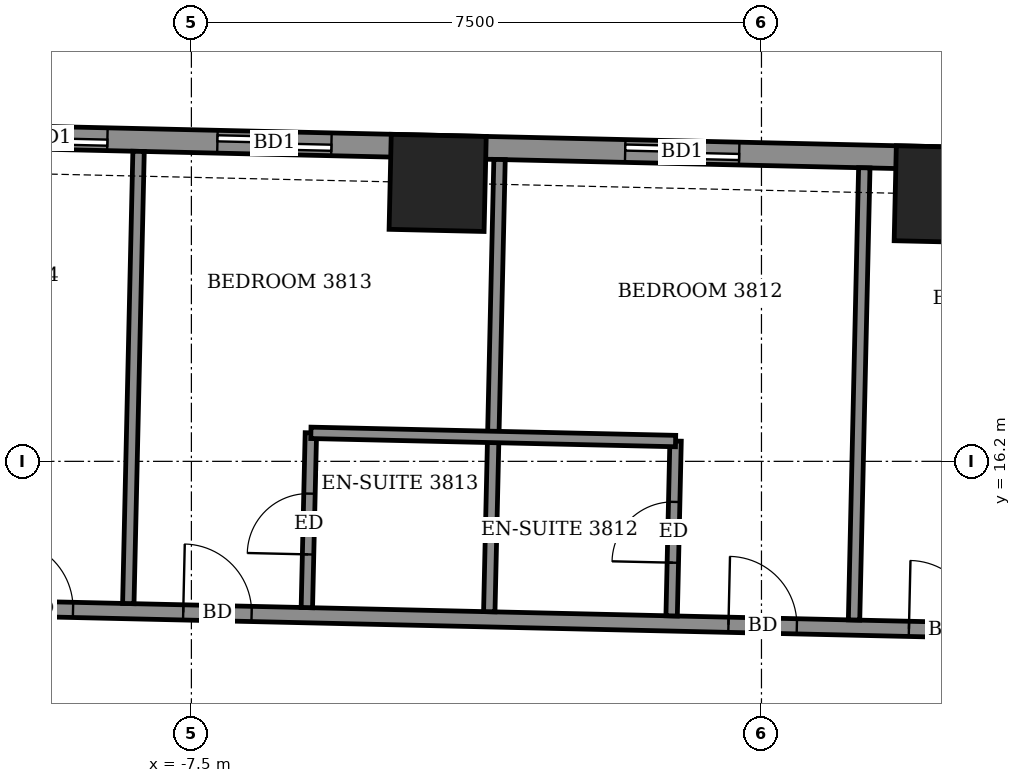
"""IFC4 building model, lengths in metres.
Left out: names, types, materials, properties, quantities, classifications, styles, units other than length and angle.
Written with IfcOpenShell. Run it as: python <this file> out.ifc"""

import sys

from ifc_helpers import new_model, si_unit, direction, frame, frame_2d, origin, origin_2d, place, context, subcontext, project, spatial, rectangle, extrude, element, fill, save


model = new_model("IFC4")
c1 = context("Model", 3, precision=1e-05, world=origin(), true_north=direction((0.0, 1.0)))
c2 = subcontext(c1, "Body", "Model", "MODEL_VIEW")
j1 = project(units=[si_unit("LENGTHUNIT", "METRE"), si_unit("PLANEANGLEUNIT", "RADIAN")], contexts=[c1])
p1 = place(None, origin())
s1 = spatial("IfcSite", under=j1, at=p1, CompositionType="ELEMENT")
p2 = place(p1, origin())
s2 = spatial("IfcBuilding", under=s1, at=p2, CompositionType="ELEMENT")
p3 = place(p2, frame((0.0, 0.0, 152.7)))
s3 = spatial("IfcBuildingStorey", under=s2, at=p3, CompositionType="ELEMENT", Elevation=152.7)
for number, where, z_axis, x_axis in (
    (1, (2.385, 19.713, -0.55), (0.0, 0.0, 1.0), (-1.0, 0.023, 0.0)),
    (2, (-4.26, 19.863, -0.55), (0.0, 0.0, 1.0), (-1.0, 0.023, 0.0)),
):
    element("IfcColumn", number, at=place(p3, frame(where, z_axis=z_axis, x_axis=x_axis)), inside=s3, PredefinedType="COLUMN", context=c2, shape_type="SweptSolid", body=[
        extrude(rectangle(XDim=1.25, YDim=1.25, at=origin_2d()), origin(), (0.0, 0.0, 1.0), 3.6),
    ])
p4 = place(p3, frame((22.181, 19.739, 0.0), z_axis=(0.0, 0.0, 1.0), x_axis=(-0.999742618326, 0.022686936846, 0.0)))
e3 = element("IfcWall", 3, at=p4, inside=s3, PredefinedType="SOLIDWALL", context=c2, shape_type="SweptSolid", body=[
    extrude(rectangle(XDim=39.58, YDim=0.3, at=frame_2d((19.79, 0.0))), origin(), (0.0, 0.0, 1.0), 3.05),
])
p5 = place(p4, frame((2.716, 0.0, 0.0)))
e4 = element("IfcOpeningElement", 4, at=p5, cuts=e3, PredefinedType="OPENING", context=c2, shape_type="SweptSolid", body=[
    extrude(rectangle(XDim=1.5, YDim=2.4, at=frame_2d((0.75, 1.2))), frame((0.0, 0.16, 0.0), z_axis=(0.0, -1.0, 0.0), x_axis=(1.0, 0.0, 0.0)), (0.0, 0.0, 1.0), 0.32),
])
p6 = place(p4, frame((8.326, 0.0, 0.0)))
e5 = element("IfcOpeningElement", 5, at=p6, cuts=e3, PredefinedType="OPENING", context=c2, shape_type="SweptSolid", body=[
    extrude(rectangle(XDim=1.5, YDim=2.4, at=frame_2d((0.75, 1.2))), frame((0.0, 0.16, 0.0), z_axis=(0.0, -1.0, 0.0), x_axis=(1.0, 0.0, 0.0)), (0.0, 0.0, 1.0), 0.32),
])
p7 = place(p4, frame((14.049, 0.0, 0.0)))
e6 = element("IfcOpeningElement", 6, at=p7, cuts=e3, PredefinedType="OPENING", context=c2, shape_type="SweptSolid", body=[
    extrude(rectangle(XDim=1.5, YDim=2.4, at=frame_2d((0.75, 1.2))), frame((0.0, 0.16, 0.0), z_axis=(0.0, -1.0, 0.0), x_axis=(1.0, 0.0, 0.0)), (0.0, 0.0, 1.0), 0.32),
])
p8 = place(p4, frame((16.998, 0.0, 0.0)))
e7 = element("IfcOpeningElement", 7, at=p8, cuts=e3, PredefinedType="OPENING", context=c2, shape_type="SweptSolid", body=[
    extrude(rectangle(XDim=1.5, YDim=2.4, at=frame_2d((0.75, 1.2))), frame((0.0, 0.16, 0.0), z_axis=(0.0, -1.0, 0.0), x_axis=(1.0, 0.0, 0.0)), (0.0, 0.0, 1.0), 0.32),
])
p9 = place(p4, frame((22.48, 0.0, 0.0)))
e8 = element("IfcOpeningElement", 8, at=p9, cuts=e3, PredefinedType="OPENING", context=c2, shape_type="SweptSolid", body=[
    extrude(rectangle(XDim=1.5, YDim=2.4, at=frame_2d((0.75, 1.2))), frame((0.0, 0.16, 0.0), z_axis=(0.0, -1.0, 0.0), x_axis=(1.0, 0.0, 0.0)), (0.0, 0.0, 1.0), 0.32),
])
p10 = place(p4, frame((27.846, 0.0, 0.0)))
e9 = element("IfcOpeningElement", 9, at=p10, cuts=e3, PredefinedType="OPENING", context=c2, shape_type="SweptSolid", body=[
    extrude(rectangle(XDim=1.5, YDim=2.4, at=frame_2d((0.75, 1.2))), frame((0.0, 0.16, 0.0), z_axis=(0.0, -1.0, 0.0), x_axis=(1.0, 0.0, 0.0)), (0.0, 0.0, 1.0), 0.32),
])
p11 = place(p4, frame((30.794, 0.0, 0.0)))
e10 = element("IfcOpeningElement", 10, at=p11, cuts=e3, PredefinedType="OPENING", context=c2, shape_type="SweptSolid", body=[
    extrude(rectangle(XDim=1.5, YDim=2.4, at=frame_2d((0.75, 1.2))), frame((0.0, 0.16, 0.0), z_axis=(0.0, -1.0, 0.0), x_axis=(1.0, 0.0, 0.0)), (0.0, 0.0, 1.0), 0.32),
])
p12 = place(p4, frame((35.705, 0.0, 0.9)))
e11 = element("IfcOpeningElement", 11, at=p12, cuts=e3, PredefinedType="OPENING", context=c2, shape_type="SweptSolid", body=[
    extrude(rectangle(XDim=2.4, YDim=1.5, at=frame_2d((1.2, 0.75))), frame((0.0, 0.16, 0.0), z_axis=(0.0, -1.0, 0.0), x_axis=(1.0, 0.0, 0.0)), (0.0, 0.0, 1.0), 0.32),
])
p13 = place(p3, frame((-21.279, 14.523, 0.0), z_axis=(0.0, 0.0, 1.0), x_axis=(0.999742669174, -0.02268469602, 0.0)))
e12 = element("IfcWall", 12, at=p13, inside=s3, PredefinedType="PARTITIONING", context=c2, shape_type="SweptSolid", body=[
    extrude(rectangle(XDim=40.639, YDim=0.2, at=frame_2d((20.319, 0.0))), origin(), (0.0, 0.0, 1.0), 3.05),
])
p14 = place(p13, frame((37.65, 0.0, 0.0)))
e13 = element("IfcOpeningElement", 13, at=p14, cuts=e12, PredefinedType="OPENING", context=c2, shape_type="SweptSolid", body=[
    extrude(rectangle(XDim=0.9, YDim=2.1, at=frame_2d((0.45, 1.05))), frame((0.0, 0.11, 0.0), z_axis=(0.0, -1.0, 0.0), x_axis=(1.0, 0.0, 0.0)), (0.0, 0.0, 1.0), 0.22),
])
p15 = place(p13, frame((32.775, 0.0, 0.0)))
e14 = element("IfcOpeningElement", 14, at=p15, cuts=e12, PredefinedType="OPENING", context=c2, shape_type="SweptSolid", body=[
    extrude(rectangle(XDim=0.9, YDim=2.1, at=frame_2d((0.45, 1.05))), frame((0.0, 0.11, 0.0), z_axis=(0.0, -1.0, 0.0), x_axis=(1.0, 0.0, 0.0)), (0.0, 0.0, 1.0), 0.22),
])
p16 = place(p13, frame((30.4, 0.0, 0.0)))
e15 = element("IfcOpeningElement", 15, at=p16, cuts=e12, PredefinedType="OPENING", context=c2, shape_type="SweptSolid", body=[
    extrude(rectangle(XDim=0.9, YDim=2.1, at=frame_2d((0.45, 1.05))), frame((0.0, 0.11, 0.0), z_axis=(0.0, -1.0, 0.0), x_axis=(1.0, 0.0, 0.0)), (0.0, 0.0, 1.0), 0.22),
])
p17 = place(p13, frame((23.225, 0.0, 0.0)))
e16 = element("IfcOpeningElement", 16, at=p17, cuts=e12, PredefinedType="OPENING", context=c2, shape_type="SweptSolid", body=[
    extrude(rectangle(XDim=0.9, YDim=2.1, at=frame_2d((0.45, 1.05))), frame((0.0, 0.11, 0.0), z_axis=(0.0, -1.0, 0.0), x_axis=(1.0, 0.0, 0.0)), (0.0, 0.0, 1.0), 0.22),
])
p18 = place(p13, frame((20.85, 0.0, 0.0)))
e17 = element("IfcOpeningElement", 17, at=p18, cuts=e12, PredefinedType="OPENING", context=c2, shape_type="SweptSolid", body=[
    extrude(rectangle(XDim=0.9, YDim=2.1, at=frame_2d((0.45, 1.05))), frame((0.0, 0.11, 0.0), z_axis=(0.0, -1.0, 0.0), x_axis=(1.0, 0.0, 0.0)), (0.0, 0.0, 1.0), 0.22),
])
p19 = place(p13, frame((13.675, 0.0, 0.0)))
e18 = element("IfcOpeningElement", 18, at=p19, cuts=e12, PredefinedType="OPENING", context=c2, shape_type="SweptSolid", body=[
    extrude(rectangle(XDim=0.9, YDim=2.1, at=frame_2d((0.45, 1.05))), frame((0.0, 0.11, 0.0), z_axis=(0.0, -1.0, 0.0), x_axis=(1.0, 0.0, 0.0)), (0.0, 0.0, 1.0), 0.22),
])
p20 = place(p13, frame((11.325, 0.0, 0.0)))
e19 = element("IfcOpeningElement", 19, at=p20, cuts=e12, PredefinedType="OPENING", context=c2, shape_type="SweptSolid", body=[
    extrude(rectangle(XDim=0.9, YDim=2.1, at=frame_2d((0.45, 1.05))), frame((0.0, 0.11, 0.0), z_axis=(0.0, -1.0, 0.0), x_axis=(1.0, 0.0, 0.0)), (0.0, 0.0, 1.0), 0.22),
])
p21 = place(p13, frame((1.6, 0.0, 0.0)))
e20 = element("IfcOpeningElement", 20, at=p21, cuts=e12, PredefinedType="OPENING", context=c2, shape_type="SweptSolid", body=[
    extrude(rectangle(XDim=1.0, YDim=2.1, at=frame_2d((0.5, 1.05))), frame((0.0, 0.11, 0.0), z_axis=(0.0, -1.0, 0.0), x_axis=(1.0, 0.0, 0.0)), (0.0, 0.0, 1.0), 0.22),
])
p22 = place(p13, frame((6.55, 0.0, 0.0)))
e21 = element("IfcOpeningElement", 21, at=p22, cuts=e12, PredefinedType="OPENING", context=c2, shape_type="SweptSolid", body=[
    extrude(rectangle(XDim=0.9, YDim=2.1, at=frame_2d((0.45, 1.05))), frame((0.0, 0.11, 0.0), z_axis=(0.0, -1.0, 0.0), x_axis=(1.0, 0.0, 0.0)), (0.0, 0.0, 1.0), 0.22),
])
p23 = place(p3, frame((-8.33, 14.329, 0.0), z_axis=(0.0, 0.0, 1.0), x_axis=(0.022688785847, 0.999742576365, 0.0)))
e22 = element("IfcWall", 22, at=p23, inside=s3, PredefinedType="PARTITIONING", context=c2, shape_type="SweptSolid", body=[
    extrude(rectangle(XDim=5.95, YDim=0.15, at=frame_2d((2.975, 0.0))), origin(), (0.0, 0.0, 1.0), 2.55),
])
p24 = place(p3, frame((-5.981, 14.276, 0.0), z_axis=(0.0, 0.0, 1.0), x_axis=(0.023037316498, 0.999734605807, 0.0)))
e23 = element("IfcWall", 23, at=p24, inside=s3, PredefinedType="PARTITIONING", context=c2, shape_type="SweptSolid", body=[
    extrude(rectangle(XDim=2.3, YDim=0.15, at=frame_2d((1.15, 0.0))), origin(), (0.0, 0.0, 1.0), 3.05),
])
p25 = place(p24, frame((0.7, 0.0, 0.0)))
e24 = element("IfcOpeningElement", 24, at=p25, cuts=e23, PredefinedType="OPENING", context=c2, shape_type="SweptSolid", body=[
    extrude(rectangle(XDim=0.8, YDim=2.1, at=frame_2d((0.4, 1.05))), frame((0.0, 0.085, 0.0), z_axis=(0.0, -1.0, 0.0), x_axis=(1.0, 0.0, 0.0)), (0.0, 0.0, 1.0), 0.17),
])
p26 = place(p3, frame((-3.581, 14.222, 0.0), z_axis=(0.0, 0.0, 1.0), x_axis=(0.022688785847, 0.999742576365, 0.0)))
e25 = element("IfcWall", 25, at=p26, inside=s3, PredefinedType="PARTITIONING", context=c2, shape_type="SweptSolid", body=[
    extrude(rectangle(XDim=5.95, YDim=0.15, at=frame_2d((2.975, 0.0))), origin(), (0.0, 0.0, 1.0), 2.55),
])
p27 = place(p3, frame((-1.182, 14.167, 0.0), z_axis=(0.0, 0.0, 1.0), x_axis=(0.022603288534, 0.999744513037, 0.0)))
e26 = element("IfcWall", 26, at=p27, inside=s3, PredefinedType="PARTITIONING", context=c2, shape_type="SweptSolid", body=[
    extrude(rectangle(XDim=2.301, YDim=0.15, at=frame_2d((1.15, 0.0))), origin(), (0.0, 0.0, 1.0), 3.05),
])
p28 = place(p27, frame((0.7, 0.0, 0.0)))
e27 = element("IfcOpeningElement", 27, at=p28, cuts=e26, PredefinedType="OPENING", context=c2, shape_type="SweptSolid", body=[
    extrude(rectangle(XDim=0.8, YDim=2.1, at=frame_2d((0.4, 1.05))), frame((0.0, 0.085, 0.0), z_axis=(0.0, -1.0, 0.0), x_axis=(1.0, 0.0, 0.0)), (0.0, 0.0, 1.0), 0.17),
])
p29 = place(p3, frame((1.218, 14.113, 0.0), z_axis=(0.0, 0.0, 1.0), x_axis=(0.022688785847, 0.999742576365, 0.0)))
e28 = element("IfcWall", 28, at=p29, inside=s3, PredefinedType="PARTITIONING", context=c2, shape_type="SweptSolid", body=[
    extrude(rectangle(XDim=5.95, YDim=0.15, at=frame_2d((2.975, 0.0))), origin(), (0.0, 0.0, 1.0), 2.55),
])
p30 = place(p3, frame((-5.928, 16.575, 0.0), z_axis=(0.0, 0.0, 1.0), x_axis=(0.999747191239, -0.022484519337, 0.0)))
e29 = element("IfcWall", 29, at=p30, inside=s3, PredefinedType="PARTITIONING", context=c2, shape_type="SweptSolid", body=[
    extrude(rectangle(XDim=4.799, YDim=0.15, at=frame_2d((2.4, 0.0))), origin(), (0.0, 0.0, 1.0), 3.05),
])
p31 = place(p9, origin())
e30 = element("IfcDoor", 30, at=p31, inside=s3, OperationType="SLIDING_TO_LEFT", PredefinedType="DOOR", context=c2, shape_type="SweptSolid", body=[
    extrude(rectangle(XDim=1.5, YDim=2.4, at=frame_2d((0.75, 1.2))), frame((0.0, 0.025, 0.0), z_axis=(0.0, -1.0, 0.0), x_axis=(1.0, 0.0, 0.0)), (0.0, 0.0, 1.0), 0.05),
])
fill(e8, e30)
p32 = place(p10, origin())
e31 = element("IfcDoor", 31, at=p32, inside=s3, OperationType="SLIDING_TO_LEFT", PredefinedType="DOOR", context=c2, shape_type="SweptSolid", body=[
    extrude(rectangle(XDim=1.5, YDim=2.4, at=frame_2d((0.75, 1.2))), frame((0.0, 0.025, 0.0), z_axis=(0.0, -1.0, 0.0), x_axis=(1.0, 0.0, 0.0)), (0.0, 0.0, 1.0), 0.05),
])
fill(e9, e31)
p33 = place(p11, origin())
e32 = element("IfcDoor", 32, at=p33, inside=s3, OperationType="SLIDING_TO_LEFT", PredefinedType="DOOR", context=c2, shape_type="SweptSolid", body=[
    extrude(rectangle(XDim=1.5, YDim=2.4, at=frame_2d((0.75, 1.2))), frame((0.0, 0.025, 0.0), z_axis=(0.0, -1.0, 0.0), x_axis=(1.0, 0.0, 0.0)), (0.0, 0.0, 1.0), 0.05),
])
fill(e10, e32)
p34 = place(p17, origin())
e33 = element("IfcDoor", 33, at=p34, inside=s3, OperationType="SINGLE_SWING_LEFT", PredefinedType="DOOR", context=c2, shape_type="SweptSolid", body=[
    extrude(rectangle(XDim=0.9, YDim=2.1, at=frame_2d((0.45, 1.05))), frame((0.0, 0.025, 0.0), z_axis=(0.0, -1.0, 0.0), x_axis=(1.0, 0.0, 0.0)), (0.0, 0.0, 1.0), 0.05),
])
fill(e16, e33)
p35 = place(p18, origin())
e34 = element("IfcDoor", 34, at=p35, inside=s3, OperationType="SINGLE_SWING_RIGHT", PredefinedType="DOOR", context=c2, shape_type="SweptSolid", body=[
    extrude(rectangle(XDim=0.9, YDim=2.1, at=frame_2d((0.45, 1.05))), frame((0.0, 0.025, 0.0), z_axis=(0.0, -1.0, 0.0), x_axis=(1.0, 0.0, 0.0)), (0.0, 0.0, 1.0), 0.05),
])
fill(e17, e34)
p36 = place(p28, origin())
e35 = element("IfcDoor", 35, at=p36, inside=s3, OperationType="SINGLE_SWING_RIGHT", PredefinedType="DOOR", context=c2, shape_type="SweptSolid", body=[
    extrude(rectangle(XDim=0.8, YDim=2.1, at=frame_2d((0.4, 1.05))), frame((0.0, 0.025, 0.0), z_axis=(0.0, -1.0, 0.0), x_axis=(1.0, 0.0, 0.0)), (0.0, 0.0, 1.0), 0.05),
])
fill(e27, e35)
p37 = place(p19, origin())
e36 = element("IfcDoor", 36, at=p37, inside=s3, OperationType="SINGLE_SWING_LEFT", PredefinedType="DOOR", context=c2, shape_type="SweptSolid", body=[
    extrude(rectangle(XDim=0.9, YDim=2.1, at=frame_2d((0.45, 1.05))), frame((0.0, 0.025, 0.0), z_axis=(0.0, -1.0, 0.0), x_axis=(1.0, 0.0, 0.0)), (0.0, 0.0, 1.0), 0.05),
])
fill(e18, e36)
p38 = place(p25, origin())
e37 = element("IfcDoor", 37, at=p38, inside=s3, OperationType="SINGLE_SWING_LEFT", PredefinedType="DOOR", context=c2, shape_type="SweptSolid", body=[
    extrude(rectangle(XDim=0.8, YDim=2.1, at=frame_2d((0.4, 1.05))), frame((0.0, 0.025, 0.0), z_axis=(0.0, -1.0, 0.0), x_axis=(1.0, 0.0, 0.0)), (0.0, 0.0, 1.0), 0.05),
])
fill(e24, e37)
p39 = place(p20, origin())
e38 = element("IfcDoor", 38, at=p39, inside=s3, OperationType="SINGLE_SWING_RIGHT", PredefinedType="DOOR", context=c2, shape_type="SweptSolid", body=[
    extrude(rectangle(XDim=0.9, YDim=2.1, at=frame_2d((0.45, 1.05))), frame((0.0, 0.025, 0.0), z_axis=(0.0, -1.0, 0.0), x_axis=(1.0, 0.0, 0.0)), (0.0, 0.0, 1.0), 0.05),
])
fill(e19, e38)
save(model, sys.argv[1])
